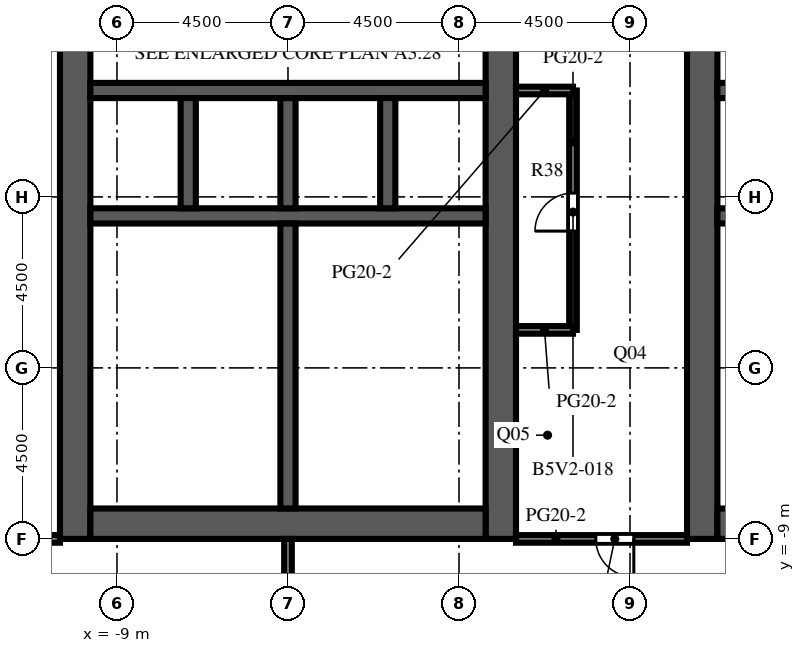
"""IFC4 building model, lengths in metres.
Left out: names, types, materials, properties, quantities, classifications, styles, units other than length and angle.
Written with IfcOpenShell. Run it as: python <this file> out.ifc"""

import sys

from ifc_helpers import new_model, si_unit, direction, frame, frame_2d, origin, place, context, subcontext, project, spatial, rectangle, extrude, element, fill, save


model = new_model("IFC4")
c1 = context("Model", 3, precision=1e-05, world=origin(), true_north=direction((0.0, 1.0)))
c2 = subcontext(c1, "Body", "Model", "MODEL_VIEW")
j1 = project(units=[si_unit("LENGTHUNIT", "METRE"), si_unit("PLANEANGLEUNIT", "RADIAN")], contexts=[c1])
p1 = place(None, origin())
s1 = spatial("IfcSite", under=j1, at=p1, CompositionType="ELEMENT")
p2 = place(p1, origin())
s2 = spatial("IfcBuilding", under=s1, at=p2, CompositionType="ELEMENT")
p3 = place(p2, frame((0.0, 0.0, 181.4)))
s3 = spatial("IfcBuildingStorey", under=s2, at=p3, CompositionType="ELEMENT", Elevation=181.4)
p4 = place(p3, frame((-10.1, -9.0, 0.0), z_axis=(0.0, 0.0, 1.0), x_axis=(0.0, 1.0, 0.0)))
e1 = element("IfcWall", 1, at=p4, inside=s3, PredefinedType="SHEAR", context=c2, shape_type="SweptSolid", body=[
    extrude(rectangle(XDim=27.5, YDim=0.8, at=frame_2d((13.75, 0.0))), origin(), (0.0, 0.0, 1.0), 4.1),
])
p5 = place(p4, frame((12.55, 0.0, 0.0)))
e2 = element("IfcOpeningElement", 2, at=p5, cuts=e1, PredefinedType="OPENING", context=c2, shape_type="SweptSolid", body=[
    extrude(rectangle(XDim=2.4, YDim=2.4, at=frame_2d((1.2, 1.2))), frame((0.0, 0.41, 0.0), z_axis=(0.0, -1.0, 0.0), x_axis=(1.0, 0.0, 0.0)), (0.0, 0.0, 1.0), 0.82),
])
p6 = place(p4, frame((6.825, 0.0, 0.0)))
e3 = element("IfcOpeningElement", 3, at=p6, cuts=e1, PredefinedType="OPENING", context=c2, shape_type="SweptSolid", body=[
    extrude(rectangle(XDim=1.2, YDim=2.1, at=frame_2d((0.6, 1.05))), frame((0.0, 0.41, 0.0), z_axis=(0.0, -1.0, 0.0), x_axis=(1.0, 0.0, 0.0)), (0.0, 0.0, 1.0), 0.82),
])
p7 = place(p4, frame((19.475, 0.0, 0.0)))
e4 = element("IfcOpeningElement", 4, at=p7, cuts=e1, PredefinedType="OPENING", context=c2, shape_type="SweptSolid", body=[
    extrude(rectangle(XDim=1.2, YDim=2.1, at=frame_2d((0.6, 1.05))), frame((0.0, 0.41, 0.0), z_axis=(0.0, -1.0, 0.0), x_axis=(1.0, 0.0, 0.0)), (0.0, 0.0, 1.0), 0.82),
])
p8 = place(p3, frame((1.1, -9.0, 0.0), z_axis=(0.0, 0.0, 1.0), x_axis=(0.0, 1.0, 0.0)))
e5 = element("IfcWall", 5, at=p8, inside=s3, PredefinedType="SHEAR", context=c2, shape_type="SweptSolid", body=[
    extrude(rectangle(XDim=27.5, YDim=0.8, at=frame_2d((13.75, 0.0))), origin(), (0.0, 0.0, 1.0), 4.1),
])
p9 = place(p8, frame((12.55, 0.0, 0.0)))
e6 = element("IfcOpeningElement", 6, at=p9, cuts=e5, PredefinedType="OPENING", context=c2, shape_type="SweptSolid", body=[
    extrude(rectangle(XDim=2.4, YDim=2.4, at=frame_2d((1.2, 1.2))), frame((0.0, 0.41, 0.0), z_axis=(0.0, -1.0, 0.0), x_axis=(1.0, 0.0, 0.0)), (0.0, 0.0, 1.0), 0.82),
])
p10 = place(p8, frame((3.85, 0.0, 0.0)))
e7 = element("IfcOpeningElement", 7, at=p10, cuts=e5, PredefinedType="OPENING", context=c2, shape_type="SweptSolid", body=[
    extrude(rectangle(XDim=0.95, YDim=2.1, at=frame_2d((0.475, 1.05))), frame((0.0, 0.41, 0.0), z_axis=(0.0, -1.0, 0.0), x_axis=(1.0, 0.0, 0.0)), (0.0, 0.0, 1.0), 0.82),
])
p11 = place(p8, frame((23.475, 0.0, 0.0)))
e8 = element("IfcOpeningElement", 8, at=p11, cuts=e5, PredefinedType="OPENING", context=c2, shape_type="SweptSolid", body=[
    extrude(rectangle(XDim=1.2, YDim=2.1, at=frame_2d((0.6, 1.05))), frame((0.0, 0.41, 0.0), z_axis=(0.0, -1.0, 0.0), x_axis=(1.0, 0.0, 0.0)), (0.0, 0.0, 1.0), 0.82),
])
p12 = place(p3, frame((-9.7, -8.6, 0.0), z_axis=(0.0, 0.0, 1.0), x_axis=(1.0, 0.0, 0.0)))
e9 = element("IfcWall", 9, at=p12, inside=s3, PredefinedType="SHEAR", context=c2, shape_type="SweptSolid", body=[
    extrude(rectangle(XDim=10.4, YDim=0.8, at=frame_2d((5.2, 0.0))), origin(), (0.0, 0.0, 1.0), 4.1),
])
p13 = place(p3, frame((-9.7, -0.5, 0.0), z_axis=(0.0, 0.0, 1.0), x_axis=(1.0, 0.0, 0.0)))
e10 = element("IfcWall", 10, at=p13, inside=s3, PredefinedType="SHEAR", context=c2, shape_type="SweptSolid", body=[
    extrude(rectangle(XDim=10.4, YDim=0.4, at=frame_2d((5.2, 0.0))), origin(), (0.0, 0.0, 1.0), 4.1),
])
p14 = place(p3, frame((-9.7, 2.8, 0.0), z_axis=(0.0, 0.0, 1.0), x_axis=(1.0, 0.0, 0.0)))
e11 = element("IfcWall", 11, at=p14, inside=s3, PredefinedType="SHEAR", context=c2, shape_type="SweptSolid", body=[
    extrude(rectangle(XDim=10.4, YDim=0.4, at=frame_2d((5.2, 0.0))), origin(), (0.0, 0.0, 1.0), 4.1),
])
p15 = place(p14, frame((0.738, 0.0, 0.0)))
e12 = element("IfcOpeningElement", 12, at=p15, cuts=e11, PredefinedType="OPENING", context=c2, shape_type="SweptSolid", body=[
    extrude(rectangle(XDim=1.1, YDim=2.1, at=frame_2d((0.55, 1.05))), frame((0.0, 0.21, 0.0), z_axis=(0.0, -1.0, 0.0), x_axis=(1.0, 0.0, 0.0)), (0.0, 0.0, 1.0), 0.42),
])
p16 = place(p14, frame((3.337, 0.0, 0.0)))
e13 = element("IfcOpeningElement", 13, at=p16, cuts=e11, PredefinedType="OPENING", context=c2, shape_type="SweptSolid", body=[
    extrude(rectangle(XDim=1.1, YDim=2.1, at=frame_2d((0.55, 1.05))), frame((0.0, 0.21, 0.0), z_axis=(0.0, -1.0, 0.0), x_axis=(1.0, 0.0, 0.0)), (0.0, 0.0, 1.0), 0.42),
])
p17 = place(p14, frame((6.012, 0.0, 0.0)))
e14 = element("IfcOpeningElement", 14, at=p17, cuts=e11, PredefinedType="OPENING", context=c2, shape_type="SweptSolid", body=[
    extrude(rectangle(XDim=1.0, YDim=2.1, at=frame_2d((0.5, 1.05))), frame((0.0, 0.21, 0.0), z_axis=(0.0, -1.0, 0.0), x_axis=(1.0, 0.0, 0.0)), (0.0, 0.0, 1.0), 0.42),
])
p18 = place(p14, frame((8.613, 0.0, 0.0)))
e15 = element("IfcOpeningElement", 15, at=p18, cuts=e11, PredefinedType="OPENING", context=c2, shape_type="SweptSolid", body=[
    extrude(rectangle(XDim=1.0, YDim=2.1, at=frame_2d((0.5, 1.05))), frame((0.0, 0.21, 0.0), z_axis=(0.0, -1.0, 0.0), x_axis=(1.0, 0.0, 0.0)), (0.0, 0.0, 1.0), 0.42),
])
for number, where, z_axis, x_axis in (
    (16, (-7.125, -0.3, 0.0), (0.0, 0.0, 1.0), (0.0, 1.0, 0.0)),
    (17, (-4.5, -0.3, 0.0), (0.0, 0.0, 1.0), (0.0, 1.0, 0.0)),
    (18, (-1.875, -0.3, 0.0), (0.0, 0.0, 1.0), (0.0, 1.0, 0.0)),
):
    element("IfcWall", number, at=place(p3, frame(where, z_axis=z_axis, x_axis=x_axis)), inside=s3, PredefinedType="SHEAR", context=c2, shape_type="SweptSolid", body=[
        extrude(rectangle(XDim=2.9, YDim=0.4, at=frame_2d((1.45, 0.0))), origin(), (0.0, 0.0, 1.0), 4.1),
    ])
p19 = place(p3, frame((-4.5, -8.2, 0.0), z_axis=(0.0, 0.0, 1.0), x_axis=(0.0, 1.0, 0.0)))
e19 = element("IfcWall", 19, at=p19, inside=s3, PredefinedType="SHEAR", context=c2, shape_type="SweptSolid", body=[
    extrude(rectangle(XDim=7.5, YDim=0.4, at=frame_2d((3.75, 0.0))), origin(), (0.0, 0.0, 1.0), 4.1),
])
p20 = place(p3, frame((6.4, -9.0, 0.0), z_axis=(0.0, 0.0, 1.0), x_axis=(0.0, 1.0, 0.0)))
e20 = element("IfcWall", 20, at=p20, inside=s3, PredefinedType="SHEAR", context=c2, shape_type="SweptSolid", body=[
    extrude(rectangle(XDim=27.5, YDim=0.8, at=frame_2d((13.75, 0.0))), origin(), (0.0, 0.0, 1.0), 4.1),
])
p21 = place(p20, frame((12.55, 0.0, 0.0)))
e21 = element("IfcOpeningElement", 21, at=p21, cuts=e20, PredefinedType="OPENING", context=c2, shape_type="SweptSolid", body=[
    extrude(rectangle(XDim=2.4, YDim=2.4, at=frame_2d((1.2, 1.2))), frame((0.0, 0.41, 0.0), z_axis=(0.0, -1.0, 0.0), x_axis=(1.0, 0.0, 0.0)), (0.0, 0.0, 1.0), 0.82),
])
p22 = place(p20, frame((3.85, 0.0, 0.0)))
e22 = element("IfcOpeningElement", 22, at=p22, cuts=e20, PredefinedType="OPENING", context=c2, shape_type="SweptSolid", body=[
    extrude(rectangle(XDim=0.95, YDim=2.1, at=frame_2d((0.475, 1.05))), frame((0.0, 0.41, 0.0), z_axis=(0.0, -1.0, 0.0), x_axis=(1.0, 0.0, 0.0)), (0.0, 0.0, 1.0), 0.82),
])
p23 = place(p20, frame((23.475, 0.0, 0.0)))
e23 = element("IfcOpeningElement", 23, at=p23, cuts=e20, PredefinedType="OPENING", context=c2, shape_type="SweptSolid", body=[
    extrude(rectangle(XDim=1.2, YDim=2.1, at=frame_2d((0.6, 1.05))), frame((0.0, 0.41, 0.0), z_axis=(0.0, -1.0, 0.0), x_axis=(1.0, 0.0, 0.0)), (0.0, 0.0, 1.0), 0.82),
])
p24 = place(p3, frame((6.8, -8.6, 0.0), z_axis=(0.0, 0.0, 1.0), x_axis=(1.0, 0.0, 0.0)))
e24 = element("IfcWall", 24, at=p24, inside=s3, PredefinedType="SHEAR", context=c2, shape_type="SweptSolid", body=[
    extrude(rectangle(XDim=10.4, YDim=0.8, at=frame_2d((5.2, 0.0))), origin(), (0.0, 0.0, 1.0), 4.1),
])
p25 = place(p3, frame((6.8, -0.5, 0.0), z_axis=(0.0, 0.0, 1.0), x_axis=(1.0, 0.0, 0.0)))
e25 = element("IfcWall", 25, at=p25, inside=s3, PredefinedType="SHEAR", context=c2, shape_type="SweptSolid", body=[
    extrude(rectangle(XDim=10.4, YDim=0.4, at=frame_2d((5.2, 0.0))), origin(), (0.0, 0.0, 1.0), 4.1),
])
p26 = place(p3, frame((6.8, 2.8, 0.0), z_axis=(0.0, 0.0, 1.0), x_axis=(1.0, 0.0, 0.0)))
e26 = element("IfcWall", 26, at=p26, inside=s3, PredefinedType="SHEAR", context=c2, shape_type="SweptSolid", body=[
    extrude(rectangle(XDim=10.4, YDim=0.4, at=frame_2d((5.2, 0.0))), origin(), (0.0, 0.0, 1.0), 4.1),
])
p27 = place(p26, frame((0.738, 0.0, 0.0)))
e27 = element("IfcOpeningElement", 27, at=p27, cuts=e26, PredefinedType="OPENING", context=c2, shape_type="SweptSolid", body=[
    extrude(rectangle(XDim=1.1, YDim=2.1, at=frame_2d((0.55, 1.05))), frame((0.0, 0.21, 0.0), z_axis=(0.0, -1.0, 0.0), x_axis=(1.0, 0.0, 0.0)), (0.0, 0.0, 1.0), 0.42),
])
p28 = place(p26, frame((3.337, 0.0, 0.0)))
e28 = element("IfcOpeningElement", 28, at=p28, cuts=e26, PredefinedType="OPENING", context=c2, shape_type="SweptSolid", body=[
    extrude(rectangle(XDim=1.1, YDim=2.1, at=frame_2d((0.55, 1.05))), frame((0.0, 0.21, 0.0), z_axis=(0.0, -1.0, 0.0), x_axis=(1.0, 0.0, 0.0)), (0.0, 0.0, 1.0), 0.42),
])
p29 = place(p26, frame((6.012, 0.0, 0.0)))
e29 = element("IfcOpeningElement", 29, at=p29, cuts=e26, PredefinedType="OPENING", context=c2, shape_type="SweptSolid", body=[
    extrude(rectangle(XDim=1.0, YDim=2.1, at=frame_2d((0.5, 1.05))), frame((0.0, 0.21, 0.0), z_axis=(0.0, -1.0, 0.0), x_axis=(1.0, 0.0, 0.0)), (0.0, 0.0, 1.0), 0.42),
])
p30 = place(p26, frame((8.613, 0.0, 0.0)))
e30 = element("IfcOpeningElement", 30, at=p30, cuts=e26, PredefinedType="OPENING", context=c2, shape_type="SweptSolid", body=[
    extrude(rectangle(XDim=1.0, YDim=2.1, at=frame_2d((0.5, 1.05))), frame((0.0, 0.21, 0.0), z_axis=(0.0, -1.0, 0.0), x_axis=(1.0, 0.0, 0.0)), (0.0, 0.0, 1.0), 0.42),
])
p31 = place(p3, frame((-4.3, -5.35, 0.0), z_axis=(0.0, 0.0, 1.0), x_axis=(1.0, 0.0, 0.0)))
e31 = element("IfcWall", 31, at=p31, inside=s3, PredefinedType="PARTITIONING", context=c2, shape_type="SweptSolid", body=[
    extrude(rectangle(XDim=5.0, YDim=0.1, at=frame_2d((2.5, 0.0))), origin(), (0.0, 0.0, 1.0), 3.5),
])
p32 = place(p31, frame((2.0, 0.0, 0.0)))
e32 = element("IfcOpeningElement", 32, at=p32, cuts=e31, PredefinedType="OPENING", context=c2, shape_type="SweptSolid", body=[
    extrude(rectangle(XDim=1.0, YDim=2.1, at=frame_2d((0.5, 1.05))), frame((0.0, 0.06, 0.0), z_axis=(0.0, -1.0, 0.0), x_axis=(1.0, 0.0, 0.0)), (0.0, 0.0, 1.0), 0.12),
])
p33 = place(p3, frame((-2.4, -4.0, 0.0), z_axis=(0.0, 0.0, 1.0), x_axis=(1.0, 0.0, 0.0)))
e33 = element("IfcWall", 33, at=p33, inside=s3, PredefinedType="PARTITIONING", context=c2, shape_type="SweptSolid", body=[
    extrude(rectangle(XDim=3.1, YDim=0.1, at=frame_2d((1.55, 0.0))), origin(), (0.0, 0.0, 1.0), 3.5),
])
p34 = place(p33, frame((1.05, 0.0, 0.0)))
e34 = element("IfcOpeningElement", 34, at=p34, cuts=e33, PredefinedType="OPENING", context=c2, shape_type="SweptSolid", body=[
    extrude(rectangle(XDim=1.0, YDim=2.1, at=frame_2d((0.5, 1.05))), frame((0.0, 0.06, 0.0), z_axis=(0.0, -1.0, 0.0), x_axis=(1.0, 0.0, 0.0)), (0.0, 0.0, 1.0), 0.12),
])
p35 = place(p3, frame((-4.3, -4.0, 0.0), z_axis=(0.0, 0.0, 1.0), x_axis=(1.0, 0.0, 0.0)))
e35 = element("IfcWall", 35, at=p35, inside=s3, PredefinedType="PARTITIONING", context=c2, shape_type="SweptSolid", body=[
    extrude(rectangle(XDim=1.9, YDim=0.1, at=frame_2d((0.95, 0.0))), origin(), (0.0, 0.0, 1.0), 3.5),
])
p36 = place(p35, frame((0.45, 0.0, 0.0)))
e36 = element("IfcOpeningElement", 36, at=p36, cuts=e35, PredefinedType="OPENING", context=c2, shape_type="SweptSolid", body=[
    extrude(rectangle(XDim=1.0, YDim=2.1, at=frame_2d((0.5, 1.05))), frame((0.0, 0.06, 0.0), z_axis=(0.0, -1.0, 0.0), x_axis=(1.0, 0.0, 0.0)), (0.0, 0.0, 1.0), 0.12),
])
p37 = place(p3, frame((-2.4, -4.0, 0.0), z_axis=(0.0, 0.0, 1.0), x_axis=(0.0, 1.0, 0.0)))
e37 = element("IfcWall", 37, at=p37, inside=s3, PredefinedType="PARTITIONING", context=c2, shape_type="SweptSolid", body=[
    extrude(rectangle(XDim=3.3, YDim=0.1, at=frame_2d((1.65, 0.0))), origin(), (0.0, 0.0, 1.0), 3.5),
])
p38 = place(p3, frame((6.8, -5.35, 0.0), z_axis=(0.0, 0.0, 1.0), x_axis=(1.0, 0.0, 0.0)))
e38 = element("IfcWall", 38, at=p38, inside=s3, PredefinedType="PARTITIONING", context=c2, shape_type="SweptSolid", body=[
    extrude(rectangle(XDim=5.0, YDim=0.1, at=frame_2d((2.5, 0.0))), origin(), (0.0, 0.0, 1.0), 3.5),
])
p39 = place(p38, frame((2.0, 0.0, 0.0)))
e39 = element("IfcOpeningElement", 39, at=p39, cuts=e38, PredefinedType="OPENING", context=c2, shape_type="SweptSolid", body=[
    extrude(rectangle(XDim=1.0, YDim=2.1, at=frame_2d((0.5, 1.05))), frame((0.0, 0.06, 0.0), z_axis=(0.0, -1.0, 0.0), x_axis=(1.0, 0.0, 0.0)), (0.0, 0.0, 1.0), 0.12),
])
p40 = place(p3, frame((6.8, -4.0, 0.0), z_axis=(0.0, 0.0, 1.0), x_axis=(1.0, 0.0, 0.0)))
e40 = element("IfcWall", 40, at=p40, inside=s3, PredefinedType="PARTITIONING", context=c2, shape_type="SweptSolid", body=[
    extrude(rectangle(XDim=3.1, YDim=0.1, at=frame_2d((1.55, 0.0))), origin(), (0.0, 0.0, 1.0), 3.5),
])
p41 = place(p40, frame((1.05, 0.0, 0.0)))
e41 = element("IfcOpeningElement", 41, at=p41, cuts=e40, PredefinedType="OPENING", context=c2, shape_type="SweptSolid", body=[
    extrude(rectangle(XDim=1.0, YDim=2.1, at=frame_2d((0.5, 1.05))), frame((0.0, 0.06, 0.0), z_axis=(0.0, -1.0, 0.0), x_axis=(1.0, 0.0, 0.0)), (0.0, 0.0, 1.0), 0.12),
])
p42 = place(p3, frame((-4.5, -26.5, 0.0), z_axis=(0.0, 0.0, 1.0), x_axis=(0.0, 1.0, 0.0)))
e42 = element("IfcWall", 42, at=p42, inside=s3, PredefinedType="PARTITIONING", context=c2, shape_type="SweptSolid", body=[
    extrude(rectangle(XDim=17.5, YDim=0.2, at=frame_2d((8.75, 0.0))), origin(), (0.0, 0.0, 1.0), 3.5),
])
p43 = place(p3, frame((3.0, -3.5, 0.0), z_axis=(0.0, 0.0, 1.0), x_axis=(0.0, 1.0, 0.0)))
e43 = element("IfcWall", 43, at=p43, inside=s3, PredefinedType="PARTITIONING", context=c2, shape_type="SweptSolid", body=[
    extrude(rectangle(XDim=6.3, YDim=0.2, at=frame_2d((3.15, 0.0))), origin(), (0.0, 0.0, 1.0), 3.5),
])
p44 = place(p43, frame((2.6, 0.0, 0.0)))
e44 = element("IfcOpeningElement", 44, at=p44, cuts=e43, PredefinedType="OPENING", context=c2, shape_type="SweptSolid", body=[
    extrude(rectangle(XDim=1.0, YDim=2.1, at=frame_2d((0.5, 1.05))), frame((0.0, 0.11, 0.0), z_axis=(0.0, -1.0, 0.0), x_axis=(1.0, 0.0, 0.0)), (0.0, 0.0, 1.0), 0.22),
])
p45 = place(p3, frame((-10.5, -9.0, 0.0), z_axis=(0.0, 0.0, 1.0), x_axis=(-1.0, 0.0, 0.0)))
e45 = element("IfcWall", 45, at=p45, inside=s3, PredefinedType="PARTITIONING", context=c2, shape_type="SweptSolid", body=[
    extrude(rectangle(XDim=3.0, YDim=0.2, at=frame_2d((1.5, 0.0))), origin(), (0.0, 0.0, 1.0), 3.5),
])
p46 = place(p45, frame((0.65, 0.0, 0.0)))
e46 = element("IfcOpeningElement", 46, at=p46, cuts=e45, PredefinedType="OPENING", context=c2, shape_type="SweptSolid", body=[
    extrude(rectangle(XDim=1.0, YDim=2.1, at=frame_2d((0.5, 1.05))), frame((0.0, 0.11, 0.0), z_axis=(0.0, -1.0, 0.0), x_axis=(1.0, 0.0, 0.0)), (0.0, 0.0, 1.0), 0.22),
])
p47 = place(p3, frame((6.0, -9.0, 0.0), z_axis=(0.0, 0.0, 1.0), x_axis=(-1.0, 0.0, 0.0)))
e47 = element("IfcWall", 47, at=p47, inside=s3, PredefinedType="PARTITIONING", context=c2, shape_type="SweptSolid", body=[
    extrude(rectangle(XDim=4.5, YDim=0.2, at=frame_2d((2.25, 0.0))), origin(), (0.0, 0.0, 1.0), 3.5),
])
p48 = place(p47, frame((1.4, 0.0, 0.0)))
e48 = element("IfcOpeningElement", 48, at=p48, cuts=e47, PredefinedType="OPENING", context=c2, shape_type="SweptSolid", body=[
    extrude(rectangle(XDim=1.0, YDim=2.1, at=frame_2d((0.5, 1.05))), frame((0.0, 0.11, 0.0), z_axis=(0.0, -1.0, 0.0), x_axis=(1.0, 0.0, 0.0)), (0.0, 0.0, 1.0), 0.22),
])
for number, where, z_axis, x_axis in (
    (49, (1.5, -3.5, 0.0), (0.0, 0.0, 1.0), (1.0, 0.0, 0.0)),
    (50, (1.5, 2.8, 0.0), (0.0, 0.0, 1.0), (1.0, 0.0, 0.0)),
):
    element("IfcWall", number, at=place(p3, frame(where, z_axis=z_axis, x_axis=x_axis)), inside=s3, PredefinedType="PARTITIONING", context=c2, shape_type="SweptSolid", body=[
        extrude(rectangle(XDim=1.5, YDim=0.2, at=frame_2d((0.75, 0.0))), origin(), (0.0, 0.0, 1.0), 3.5),
    ])
p49 = place(p15, origin())
e51 = element("IfcDoor", 51, at=p49, inside=s3, OperationType="DOUBLE_DOOR_SLIDING", PredefinedType="DOOR", context=c2, shape_type="SweptSolid", body=[
    extrude(rectangle(XDim=1.1, YDim=2.1, at=frame_2d((0.55, 1.05))), frame((0.0, 0.025, 0.0), z_axis=(0.0, -1.0, 0.0), x_axis=(1.0, 0.0, 0.0)), (0.0, 0.0, 1.0), 0.05),
])
fill(e12, e51)
p50 = place(p16, origin())
e52 = element("IfcDoor", 52, at=p50, inside=s3, OperationType="DOUBLE_DOOR_SLIDING", PredefinedType="DOOR", context=c2, shape_type="SweptSolid", body=[
    extrude(rectangle(XDim=1.1, YDim=2.1, at=frame_2d((0.55, 1.05))), frame((0.0, 0.025, 0.0), z_axis=(0.0, -1.0, 0.0), x_axis=(1.0, 0.0, 0.0)), (0.0, 0.0, 1.0), 0.05),
])
fill(e13, e52)
p51 = place(p5, origin())
e53 = element("IfcDoor", 53, at=p51, inside=s3, OperationType="DOUBLE_DOOR_DOUBLE_SWING", PredefinedType="DOOR", context=c2, shape_type="SweptSolid", body=[
    extrude(rectangle(XDim=2.4, YDim=2.4, at=frame_2d((1.2, 1.2))), frame((0.0, 0.025, 0.0), z_axis=(0.0, -1.0, 0.0), x_axis=(1.0, 0.0, 0.0)), (0.0, 0.0, 1.0), 0.05),
])
fill(e2, e53)
p52 = place(p9, origin())
e54 = element("IfcDoor", 54, at=p52, inside=s3, OperationType="DOUBLE_DOOR_DOUBLE_SWING", PredefinedType="DOOR", context=c2, shape_type="SweptSolid", body=[
    extrude(rectangle(XDim=2.4, YDim=2.4, at=frame_2d((1.2, 1.2))), frame((0.0, 0.025, 0.0), z_axis=(0.0, -1.0, 0.0), x_axis=(1.0, 0.0, 0.0)), (0.0, 0.0, 1.0), 0.05),
])
fill(e6, e54)
p53 = place(p21, origin())
e55 = element("IfcDoor", 55, at=p53, inside=s3, OperationType="DOUBLE_DOOR_DOUBLE_SWING", PredefinedType="DOOR", context=c2, shape_type="SweptSolid", body=[
    extrude(rectangle(XDim=2.4, YDim=2.4, at=frame_2d((1.2, 1.2))), frame((0.0, 0.025, 0.0), z_axis=(0.0, -1.0, 0.0), x_axis=(1.0, 0.0, 0.0)), (0.0, 0.0, 1.0), 0.05),
])
fill(e21, e55)
p54 = place(p6, origin())
e56 = element("IfcDoor", 56, at=p54, inside=s3, OperationType="SINGLE_SWING_LEFT", PredefinedType="DOOR", context=c2, shape_type="SweptSolid", body=[
    extrude(rectangle(XDim=1.2, YDim=2.1, at=frame_2d((0.6, 1.05))), frame((0.0, 0.025, 0.0), z_axis=(0.0, -1.0, 0.0), x_axis=(1.0, 0.0, 0.0)), (0.0, 0.0, 1.0), 0.05),
])
fill(e3, e56)
p55 = place(p17, origin())
e57 = element("IfcDoor", 57, at=p55, inside=s3, OperationType="SINGLE_SWING_LEFT", PredefinedType="DOOR", context=c2, shape_type="SweptSolid", body=[
    extrude(rectangle(XDim=1.0, YDim=2.1, at=frame_2d((0.5, 1.05))), frame((0.0, 0.025, 0.0), z_axis=(0.0, -1.0, 0.0), x_axis=(1.0, 0.0, 0.0)), (0.0, 0.0, 1.0), 0.05),
])
fill(e14, e57)
p56 = place(p18, origin())
e58 = element("IfcDoor", 58, at=p56, inside=s3, OperationType="SINGLE_SWING_RIGHT", PredefinedType="DOOR", context=c2, shape_type="SweptSolid", body=[
    extrude(rectangle(XDim=1.0, YDim=2.1, at=frame_2d((0.5, 1.05))), frame((0.0, 0.025, 0.0), z_axis=(0.0, -1.0, 0.0), x_axis=(1.0, 0.0, 0.0)), (0.0, 0.0, 1.0), 0.05),
])
fill(e15, e58)
p57 = place(p10, origin())
e59 = element("IfcDoor", 59, at=p57, inside=s3, OperationType="SINGLE_SWING_LEFT", PredefinedType="DOOR", context=c2, shape_type="SweptSolid", body=[
    extrude(rectangle(XDim=0.95, YDim=2.1, at=frame_2d((0.475, 1.05))), frame((0.0, 0.375, 0.0), z_axis=(0.0, -1.0, 0.0), x_axis=(1.0, 0.0, 0.0)), (0.0, 0.0, 1.0), 0.05),
])
fill(e7, e59)
p58 = place(p32, origin())
e60 = element("IfcDoor", 60, at=p58, inside=s3, OperationType="SINGLE_SWING_RIGHT", PredefinedType="DOOR", context=c2, shape_type="SweptSolid", body=[
    extrude(rectangle(XDim=1.0, YDim=2.1, at=frame_2d((0.5, 1.05))), frame((0.0, 0.025, 0.0), z_axis=(0.0, -1.0, 0.0), x_axis=(1.0, 0.0, 0.0)), (0.0, 0.0, 1.0), 0.05),
])
fill(e32, e60)
p59 = place(p34, origin())
e61 = element("IfcDoor", 61, at=p59, inside=s3, OperationType="SINGLE_SWING_LEFT", PredefinedType="DOOR", context=c2, shape_type="SweptSolid", body=[
    extrude(rectangle(XDim=1.0, YDim=2.1, at=frame_2d((0.5, 1.05))), frame((0.0, 0.025, 0.0), z_axis=(0.0, -1.0, 0.0), x_axis=(1.0, 0.0, 0.0)), (0.0, 0.0, 1.0), 0.05),
])
fill(e34, e61)
p60 = place(p36, origin())
e62 = element("IfcDoor", 62, at=p60, inside=s3, OperationType="SINGLE_SWING_RIGHT", PredefinedType="DOOR", context=c2, shape_type="SweptSolid", body=[
    extrude(rectangle(XDim=1.0, YDim=2.1, at=frame_2d((0.5, 1.05))), frame((0.0, 0.025, 0.0), z_axis=(0.0, -1.0, 0.0), x_axis=(1.0, 0.0, 0.0)), (0.0, 0.0, 1.0), 0.05),
])
fill(e36, e62)
p61 = place(p22, origin())
e63 = element("IfcDoor", 63, at=p61, inside=s3, OperationType="SINGLE_SWING_RIGHT", PredefinedType="DOOR", context=c2, shape_type="SweptSolid", body=[
    extrude(rectangle(XDim=0.95, YDim=2.1, at=frame_2d((0.475, 1.05))), frame((0.0, -0.325, 0.0), z_axis=(0.0, -1.0, 0.0), x_axis=(1.0, 0.0, 0.0)), (0.0, 0.0, 1.0), 0.05),
])
fill(e22, e63)
p62 = place(p48, origin())
e64 = element("IfcDoor", 64, at=p62, inside=s3, OperationType="SINGLE_SWING_LEFT", PredefinedType="DOOR", context=c2, shape_type="SweptSolid", body=[
    extrude(rectangle(XDim=1.0, YDim=2.1, at=frame_2d((0.5, 1.05))), frame((0.0, 0.025, 0.0), z_axis=(0.0, -1.0, 0.0), x_axis=(1.0, 0.0, 0.0)), (0.0, 0.0, 1.0), 0.05),
])
fill(e48, e64)
p63 = place(p44, origin())
e65 = element("IfcDoor", 65, at=p63, inside=s3, OperationType="SINGLE_SWING_LEFT", PredefinedType="DOOR", context=c2, shape_type="SweptSolid", body=[
    extrude(rectangle(XDim=1.0, YDim=2.1, at=frame_2d((0.5, 1.05))), frame((0.0, 0.025, 0.0), z_axis=(0.0, -1.0, 0.0), x_axis=(1.0, 0.0, 0.0)), (0.0, 0.0, 1.0), 0.05),
])
fill(e44, e65)
save(model, sys.argv[1])
